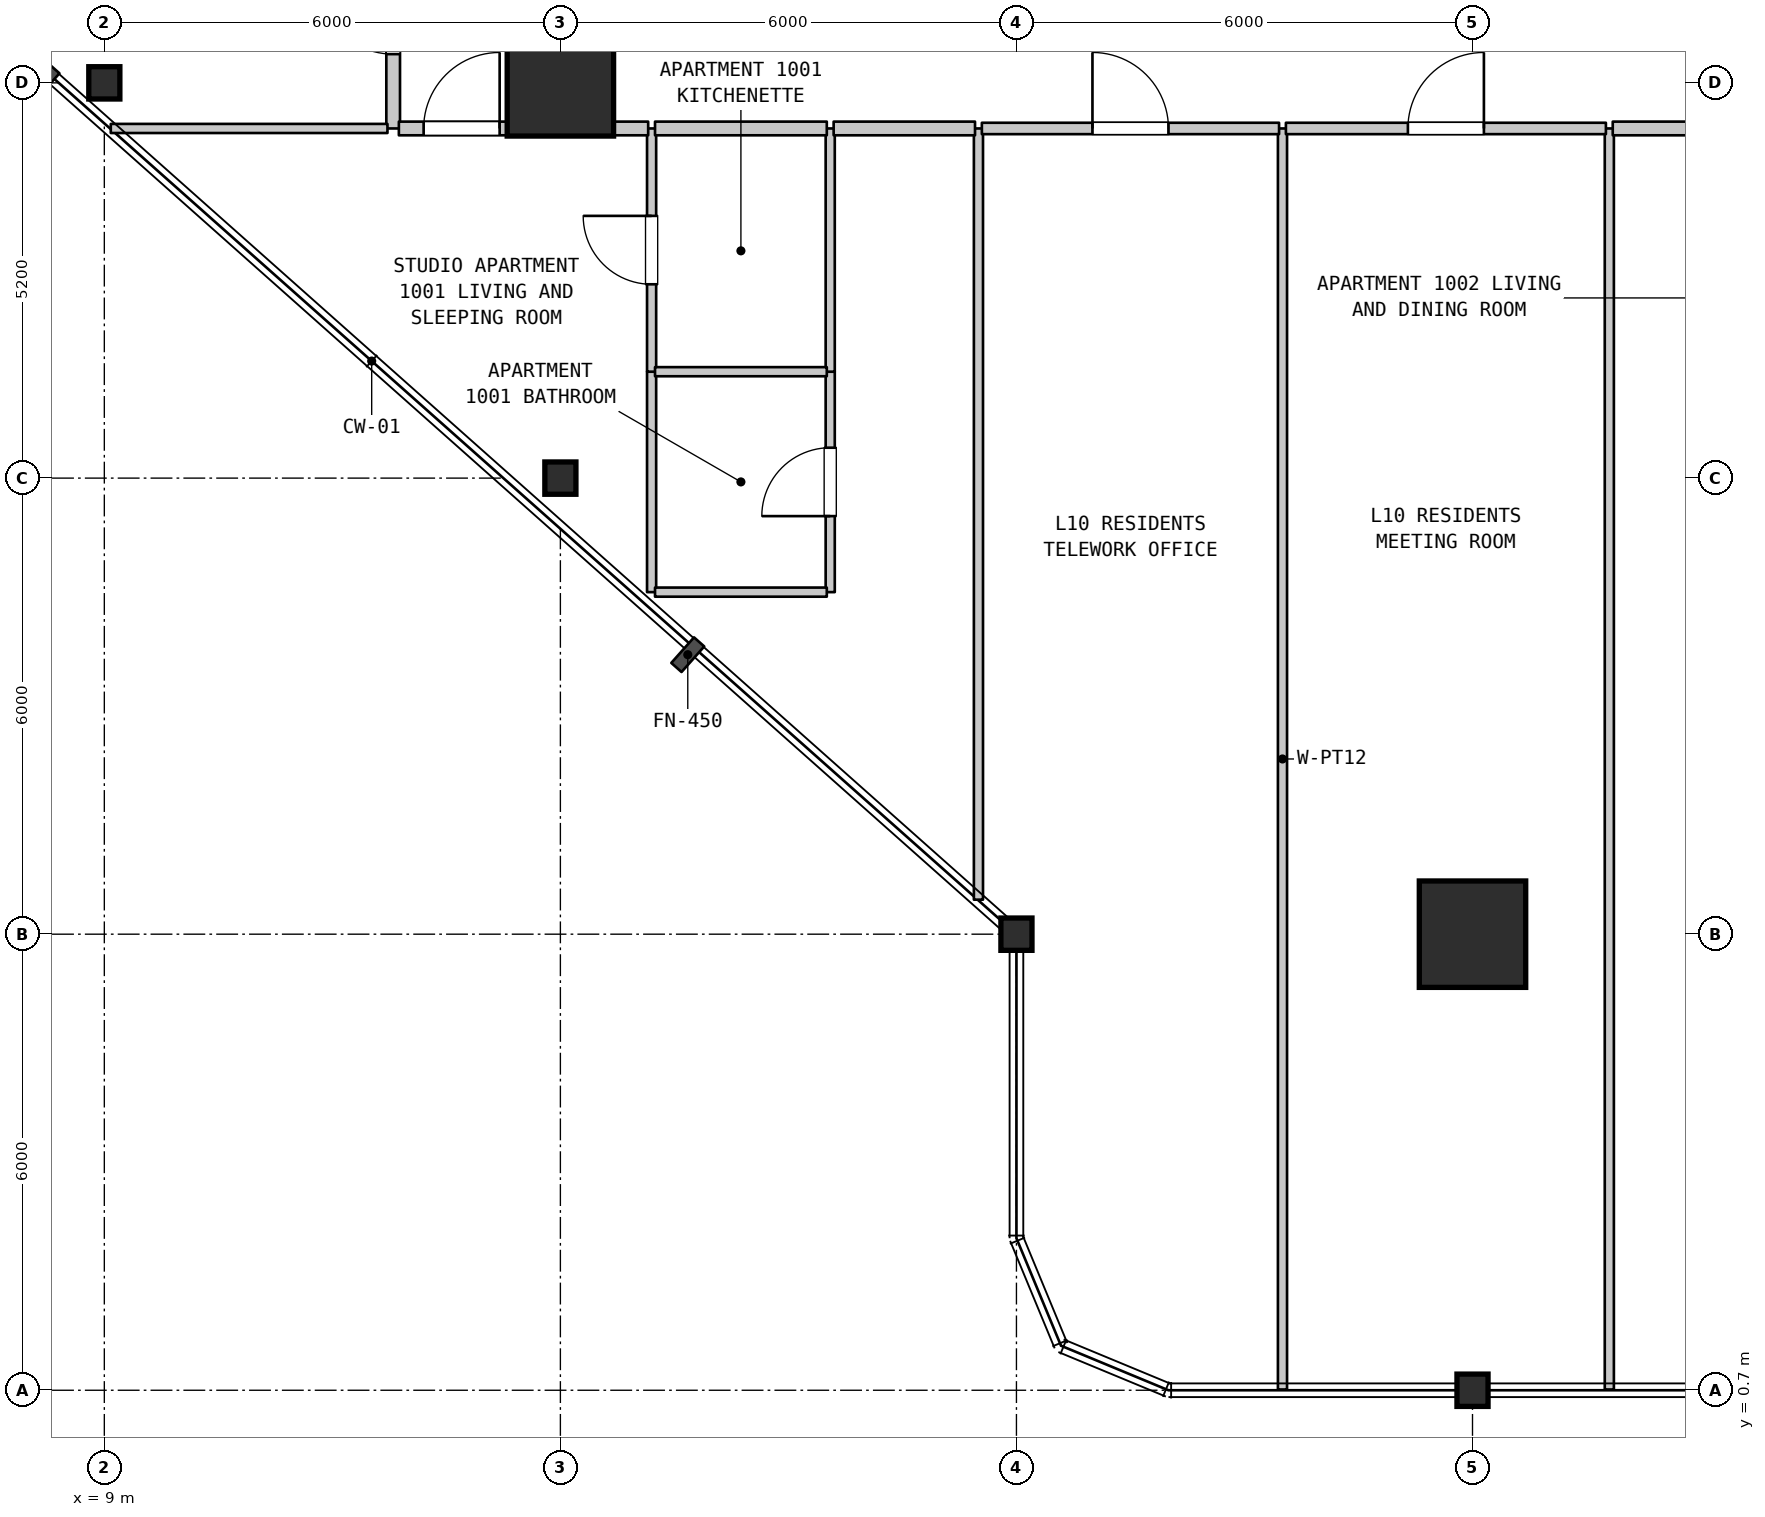
"""IFC4 building model, lengths in metres.
Left out: names, types, materials, properties, quantities, classifications, styles, units other than length and angle.
Written with IfcOpenShell. Run it as: python <this file> out.ifc"""

import sys

from ifc_helpers import new_model, si_unit, direction, frame, frame_2d, origin, origin_2d, place, context, subcontext, project, spatial, rectangle, i_section, extrude, element, fill, save


model = new_model("IFC4")
c1 = context("Model", 3, precision=1e-05, world=origin(), true_north=direction((0.0, 1.0)))
c2 = subcontext(c1, "Body", "Model", "MODEL_VIEW")
j1 = project(units=[si_unit("LENGTHUNIT", "METRE"), si_unit("PLANEANGLEUNIT", "RADIAN")], contexts=[c1])
p1 = place(None, origin())
s1 = spatial("IfcSite", under=j1, at=p1, CompositionType="ELEMENT")
p2 = place(p1, origin())
s2 = spatial("IfcBuilding", under=s1, at=p2, CompositionType="ELEMENT")
p3 = place(p2, frame((0.0, 0.0, 46.2)))
s3 = spatial("IfcBuildingStorey", under=s2, at=p3, CompositionType="ELEMENT", Elevation=46.2)
for number, where, z_axis, x_axis in (
    (1, (9.0, 17.9, 0.0), (0.0, 0.0, 1.0), (1.0, 0.0, 0.0)),
    (2, (15.0, 12.7, 0.0), (0.0, 0.0, 1.0), (1.0, 0.0, 0.0)),
):
    element("IfcColumn", number, at=place(p3, frame(where, z_axis=z_axis, x_axis=x_axis)), inside=s3, PredefinedType="COLUMN", context=c2, shape_type="SweptSolid", body=[
        extrude(i_section(OverallWidth=0.409, OverallDepth=0.425, WebThickness=0.032, FlangeThickness=0.052, FilletRadius=0.015, at=origin_2d()), origin(), (0.0, 0.0, 1.0), 3.7),
    ])
p4 = place(p3, frame((15.0, 17.9, 0.0), z_axis=(0.0, 0.0, 1.0), x_axis=(1.0, 0.0, 0.0)))
e3 = element("IfcColumn", 3, at=p4, inside=s3, PredefinedType="COLUMN", context=c2, shape_type="SweptSolid", body=[
    extrude(rectangle(XDim=1.4, YDim=1.4, at=origin_2d()), origin(), (0.0, 0.0, 1.0), 3.7),
])
for number, where, z_axis, x_axis in (
    (4, (21.0, 6.7, 0.0), (0.0, 0.0, 1.0), (1.0, 0.0, 0.0)),
    (5, (27.0, 0.7, 0.0), (0.0, 0.0, 1.0), (1.0, 0.0, 0.0)),
):
    element("IfcColumn", number, at=place(p3, frame(where, z_axis=z_axis, x_axis=x_axis)), inside=s3, PredefinedType="COLUMN", context=c2, shape_type="SweptSolid", body=[
        extrude(i_section(OverallWidth=0.409, OverallDepth=0.425, WebThickness=0.032, FlangeThickness=0.052, FilletRadius=0.015, at=origin_2d()), origin(), (0.0, 0.0, 1.0), 3.7),
    ])
p5 = place(p3, frame((27.0, 6.7, 0.0), z_axis=(0.0, 0.0, 1.0), x_axis=(1.0, 0.0, 0.0)))
e6 = element("IfcColumn", 6, at=p5, inside=s3, PredefinedType="COLUMN", context=c2, shape_type="SweptSolid", body=[
    extrude(rectangle(XDim=1.4, YDim=1.4, at=origin_2d()), origin(), (0.0, 0.0, 1.0), 3.7),
])
p6 = place(p3, frame((12.8, 17.3, 0.0), z_axis=(0.0, 0.0, 1.0), x_axis=(0.0, 1.0, 0.0)))
e7 = element("IfcWall", 7, at=p6, inside=s3, PredefinedType="STANDARD", context=c2, shape_type="SweptSolid", body=[
    extrude(rectangle(XDim=3.1, YDim=0.18, at=frame_2d((1.55, 0.0))), origin(), (0.0, 0.0, 1.0), 3.385),
])
p7 = place(p6, frame((0.978, 0.0, 0.0)))
e8 = element("IfcOpeningElement", 8, at=p7, cuts=e7, PredefinedType="OPENING", context=c2, shape_type="SweptSolid", body=[
    extrude(rectangle(XDim=1.0, YDim=2.15, at=frame_2d((0.5, 1.075))), frame((0.0, 0.1, 0.0), z_axis=(0.0, -1.0, 0.0), x_axis=(1.0, 0.0, 0.0)), (0.0, 0.0, 1.0), 0.2),
])
p8 = place(p3, frame((16.2, 11.2, 0.0), z_axis=(0.0, 0.0, 1.0), x_axis=(0.0, 1.0, 0.0)))
e9 = element("IfcWall", 9, at=p8, inside=s3, PredefinedType="PARTITIONING", context=c2, shape_type="SweptSolid", body=[
    extrude(rectangle(XDim=2.9, YDim=0.12, at=frame_2d((1.45, 0.0))), origin(), (0.0, 0.0, 1.0), 3.385),
])
p9 = place(p3, frame((16.2, 14.1, 0.0), z_axis=(0.0, 0.0, 1.0), x_axis=(0.0, 1.0, 0.0)))
e10 = element("IfcWall", 10, at=p9, inside=s3, PredefinedType="PARTITIONING", context=c2, shape_type="SweptSolid", body=[
    extrude(rectangle(XDim=3.2, YDim=0.12, at=frame_2d((1.6, 0.0))), origin(), (0.0, 0.0, 1.0), 3.385),
])
p10 = place(p9, frame((1.15, 0.0, 0.0)))
e11 = element("IfcOpeningElement", 11, at=p10, cuts=e10, PredefinedType="OPENING", context=c2, shape_type="SweptSolid", body=[
    extrude(rectangle(XDim=0.9, YDim=2.15, at=frame_2d((0.45, 1.075))), frame((0.0, 0.07, 0.0), z_axis=(0.0, -1.0, 0.0), x_axis=(1.0, 0.0, 0.0)), (0.0, 0.0, 1.0), 0.14),
])
p11 = place(p3, frame((18.55, 11.2, 0.0), z_axis=(0.0, 0.0, 1.0), x_axis=(0.0, 1.0, 0.0)))
e12 = element("IfcWall", 12, at=p11, inside=s3, PredefinedType="PARTITIONING", context=c2, shape_type="SweptSolid", body=[
    extrude(rectangle(XDim=2.9, YDim=0.12, at=frame_2d((1.45, 0.0))), origin(), (0.0, 0.0, 1.0), 3.385),
])
p12 = place(p11, frame((1.0, 0.0, 0.0)))
e13 = element("IfcOpeningElement", 13, at=p12, cuts=e12, PredefinedType="OPENING", context=c2, shape_type="SweptSolid", body=[
    extrude(rectangle(XDim=0.9, YDim=2.1, at=frame_2d((0.45, 1.05))), frame((0.0, 0.07, 0.0), z_axis=(0.0, -1.0, 0.0), x_axis=(1.0, 0.0, 0.0)), (0.0, 0.0, 1.0), 0.14),
])
p13 = place(p3, frame((18.55, 14.1, 0.0), z_axis=(0.0, 0.0, 1.0), x_axis=(0.0, 1.0, 0.0)))
e14 = element("IfcWall", 14, at=p13, inside=s3, PredefinedType="PARTITIONING", context=c2, shape_type="SweptSolid", body=[
    extrude(rectangle(XDim=3.2, YDim=0.12, at=frame_2d((1.6, 0.0))), origin(), (0.0, 0.0, 1.0), 3.385),
])
p14 = place(p3, frame((20.5, 7.154, 0.0), z_axis=(0.0, 0.0, 1.0), x_axis=(0.0, 1.0, 0.0)))
e15 = element("IfcWall", 15, at=p14, inside=s3, PredefinedType="PARTITIONING", context=c2, shape_type="SweptSolid", body=[
    extrude(rectangle(XDim=10.146, YDim=0.12, at=frame_2d((5.073, 0.0))), origin(), (0.0, 0.0, 1.0), 3.385),
])
for number, where, z_axis, x_axis in (
    (16, (24.5, 0.71, 0.0), (0.0, 0.0, 1.0), (0.0, 1.0, 0.0)),
    (17, (28.8, 0.71, 0.0), (0.0, 0.0, 1.0), (0.0, 1.0, 0.0)),
):
    element("IfcWall", number, at=place(p3, frame(where, z_axis=z_axis, x_axis=x_axis)), inside=s3, PredefinedType="PARTITIONING", context=c2, shape_type="SweptSolid", body=[
        extrude(rectangle(XDim=16.59, YDim=0.12, at=frame_2d((8.295, 0.0))), origin(), (0.0, 0.0, 1.0), 3.385),
    ])
for number, where, z_axis, x_axis in (
    (18, (16.245, 11.2, 0.0), (0.0, 0.0, 1.0), (1.0, 0.0, 0.0)),
    (19, (16.245, 14.1, 0.0), (0.0, 0.0, 1.0), (1.0, 0.0, 0.0)),
):
    element("IfcWall", number, at=place(p3, frame(where, z_axis=z_axis, x_axis=x_axis)), inside=s3, PredefinedType="PARTITIONING", context=c2, shape_type="SweptSolid", body=[
        extrude(rectangle(XDim=2.26, YDim=0.12, at=frame_2d((1.13, 0.0))), origin(), (0.0, 0.0, 1.0), 3.385),
    ])
p15 = place(p3, frame((9.085, 17.3, 0.0), z_axis=(0.0, 0.0, 1.0), x_axis=(1.0, 0.0, 0.0)))
e20 = element("IfcWall", 20, at=p15, inside=s3, PredefinedType="PARTITIONING", context=c2, shape_type="SweptSolid", body=[
    extrude(rectangle(XDim=3.64, YDim=0.12, at=frame_2d((1.82, 0.0))), origin(), (0.0, 0.0, 1.0), 3.385),
])
p16 = place(p3, frame((12.875, 17.3, 0.0), z_axis=(0.0, 0.0, 1.0), x_axis=(1.0, 0.0, 0.0)))
e21 = element("IfcWall", 21, at=p16, inside=s3, PredefinedType="STANDARD", context=c2, shape_type="SweptSolid", body=[
    extrude(rectangle(XDim=3.28, YDim=0.18, at=frame_2d((1.64, 0.0))), origin(), (0.0, 0.0, 1.0), 3.385),
])
p17 = place(p16, frame((0.326, 0.0, 0.0)))
e22 = element("IfcOpeningElement", 22, at=p17, cuts=e21, PredefinedType="OPENING", context=c2, shape_type="SweptSolid", body=[
    extrude(rectangle(XDim=1.0, YDim=2.15, at=frame_2d((0.5, 1.075))), frame((0.0, 0.1, 0.0), z_axis=(0.0, -1.0, 0.0), x_axis=(1.0, 0.0, 0.0)), (0.0, 0.0, 1.0), 0.2),
])
p18 = place(p3, frame((16.245, 17.3, 0.0), z_axis=(0.0, 0.0, 1.0), x_axis=(1.0, 0.0, 0.0)))
e23 = element("IfcWall", 23, at=p18, inside=s3, PredefinedType="STANDARD", context=c2, shape_type="SweptSolid", body=[
    extrude(rectangle(XDim=2.26, YDim=0.18, at=frame_2d((1.13, 0.0))), origin(), (0.0, 0.0, 1.0), 3.385),
])
p19 = place(p3, frame((18.595, 17.3, 0.0), z_axis=(0.0, 0.0, 1.0), x_axis=(1.0, 0.0, 0.0)))
e24 = element("IfcWall", 24, at=p19, inside=s3, PredefinedType="STANDARD", context=c2, shape_type="SweptSolid", body=[
    extrude(rectangle(XDim=1.86, YDim=0.18, at=frame_2d((0.93, 0.0))), origin(), (0.0, 0.0, 1.0), 3.385),
])
p20 = place(p3, frame((20.545, 17.3, 0.0), z_axis=(0.0, 0.0, 1.0), x_axis=(1.0, 0.0, 0.0)))
e25 = element("IfcWall", 25, at=p20, inside=s3, PredefinedType="STANDARD", context=c2, shape_type="SweptSolid", body=[
    extrude(rectangle(XDim=3.91, YDim=0.15, at=frame_2d((1.955, 0.0))), origin(), (0.0, 0.0, 1.0), 3.385),
])
p21 = place(p20, frame((1.455, 0.0, 0.0)))
e26 = element("IfcOpeningElement", 26, at=p21, cuts=e25, PredefinedType="OPENING", context=c2, shape_type="SweptSolid", body=[
    extrude(rectangle(XDim=1.0, YDim=2.15, at=frame_2d((0.5, 1.075))), frame((0.0, 0.085, 0.0), z_axis=(0.0, -1.0, 0.0), x_axis=(1.0, 0.0, 0.0)), (0.0, 0.0, 1.0), 0.17),
])
p22 = place(p3, frame((24.545, 17.3, 0.0), z_axis=(0.0, 0.0, 1.0), x_axis=(1.0, 0.0, 0.0)))
e27 = element("IfcWall", 27, at=p22, inside=s3, PredefinedType="STANDARD", context=c2, shape_type="SweptSolid", body=[
    extrude(rectangle(XDim=4.21, YDim=0.15, at=frame_2d((2.105, 0.0))), origin(), (0.0, 0.0, 1.0), 3.385),
])
p23 = place(p22, frame((1.605, 0.0, 0.0)))
e28 = element("IfcOpeningElement", 28, at=p23, cuts=e27, PredefinedType="OPENING", context=c2, shape_type="SweptSolid", body=[
    extrude(rectangle(XDim=1.0, YDim=2.15, at=frame_2d((0.5, 1.075))), frame((0.0, 0.085, 0.0), z_axis=(0.0, -1.0, 0.0), x_axis=(1.0, 0.0, 0.0)), (0.0, 0.0, 1.0), 0.17),
])
p24 = place(p3, frame((28.845, 17.3, 0.0), z_axis=(0.0, 0.0, 1.0), x_axis=(1.0, 0.0, 0.0)))
e29 = element("IfcWall", 29, at=p24, inside=s3, PredefinedType="STANDARD", context=c2, shape_type="SweptSolid", body=[
    extrude(rectangle(XDim=4.38, YDim=0.18, at=frame_2d((2.19, 0.0))), origin(), (0.0, 0.0, 1.0), 3.385),
])
p25 = place(p24, frame((1.619, 0.0, 0.0)))
e30 = element("IfcOpeningElement", 30, at=p25, cuts=e29, PredefinedType="OPENING", context=c2, shape_type="SweptSolid", body=[
    extrude(rectangle(XDim=1.0, YDim=2.15, at=frame_2d((0.5, 1.075))), frame((0.0, 0.1, 0.0), z_axis=(0.0, -1.0, 0.0), x_axis=(1.0, 0.0, 0.0)), (0.0, 0.0, 1.0), 0.2),
])
p26 = place(p7, origin())
e31 = element("IfcDoor", 31, at=p26, inside=s3, OperationType="SINGLE_SWING_RIGHT", PredefinedType="DOOR", context=c2, shape_type="SweptSolid", body=[
    extrude(rectangle(XDim=1.0, YDim=2.15, at=frame_2d((0.5, 1.075))), frame((0.0, 0.025, 0.0), z_axis=(0.0, -1.0, 0.0), x_axis=(1.0, 0.0, 0.0)), (0.0, 0.0, 1.0), 0.05),
])
fill(e8, e31)
p27 = place(p10, origin())
e32 = element("IfcDoor", 32, at=p27, inside=s3, OperationType="SINGLE_SWING_RIGHT", PredefinedType="DOOR", context=c2, shape_type="SweptSolid", body=[
    extrude(rectangle(XDim=0.9, YDim=2.15, at=frame_2d((0.45, 1.075))), frame((0.0, 0.025, 0.0), z_axis=(0.0, -1.0, 0.0), x_axis=(1.0, 0.0, 0.0)), (0.0, 0.0, 1.0), 0.05),
])
fill(e11, e32)
p28 = place(p12, origin())
e33 = element("IfcDoor", 33, at=p28, inside=s3, OperationType="SINGLE_SWING_LEFT", PredefinedType="DOOR", context=c2, shape_type="SweptSolid", body=[
    extrude(rectangle(XDim=0.9, YDim=2.1, at=frame_2d((0.45, 1.05))), frame((0.0, 0.025, 0.0), z_axis=(0.0, -1.0, 0.0), x_axis=(1.0, 0.0, 0.0)), (0.0, 0.0, 1.0), 0.05),
])
fill(e13, e33)
p29 = place(p17, origin())
e34 = element("IfcDoor", 34, at=p29, inside=s3, OperationType="SINGLE_SWING_RIGHT", PredefinedType="DOOR", context=c2, shape_type="SweptSolid", body=[
    extrude(rectangle(XDim=1.0, YDim=2.15, at=frame_2d((0.5, 1.075))), frame((0.0, 0.025, 0.0), z_axis=(0.0, -1.0, 0.0), x_axis=(1.0, 0.0, 0.0)), (0.0, 0.0, 1.0), 0.05),
])
fill(e22, e34)
p30 = place(p21, origin())
e35 = element("IfcDoor", 35, at=p30, inside=s3, OperationType="SINGLE_SWING_LEFT", PredefinedType="DOOR", context=c2, shape_type="SweptSolid", body=[
    extrude(rectangle(XDim=1.0, YDim=2.15, at=frame_2d((0.5, 1.075))), frame((0.0, 0.025, 0.0), z_axis=(0.0, -1.0, 0.0), x_axis=(1.0, 0.0, 0.0)), (0.0, 0.0, 1.0), 0.05),
])
fill(e26, e35)
p31 = place(p23, origin())
e36 = element("IfcDoor", 36, at=p31, inside=s3, OperationType="SINGLE_SWING_RIGHT", PredefinedType="DOOR", context=c2, shape_type="SweptSolid", body=[
    extrude(rectangle(XDim=1.0, YDim=2.15, at=frame_2d((0.5, 1.075))), frame((0.0, 0.025, 0.0), z_axis=(0.0, -1.0, 0.0), x_axis=(1.0, 0.0, 0.0)), (0.0, 0.0, 1.0), 0.05),
])
fill(e28, e36)
save(model, sys.argv[1])
